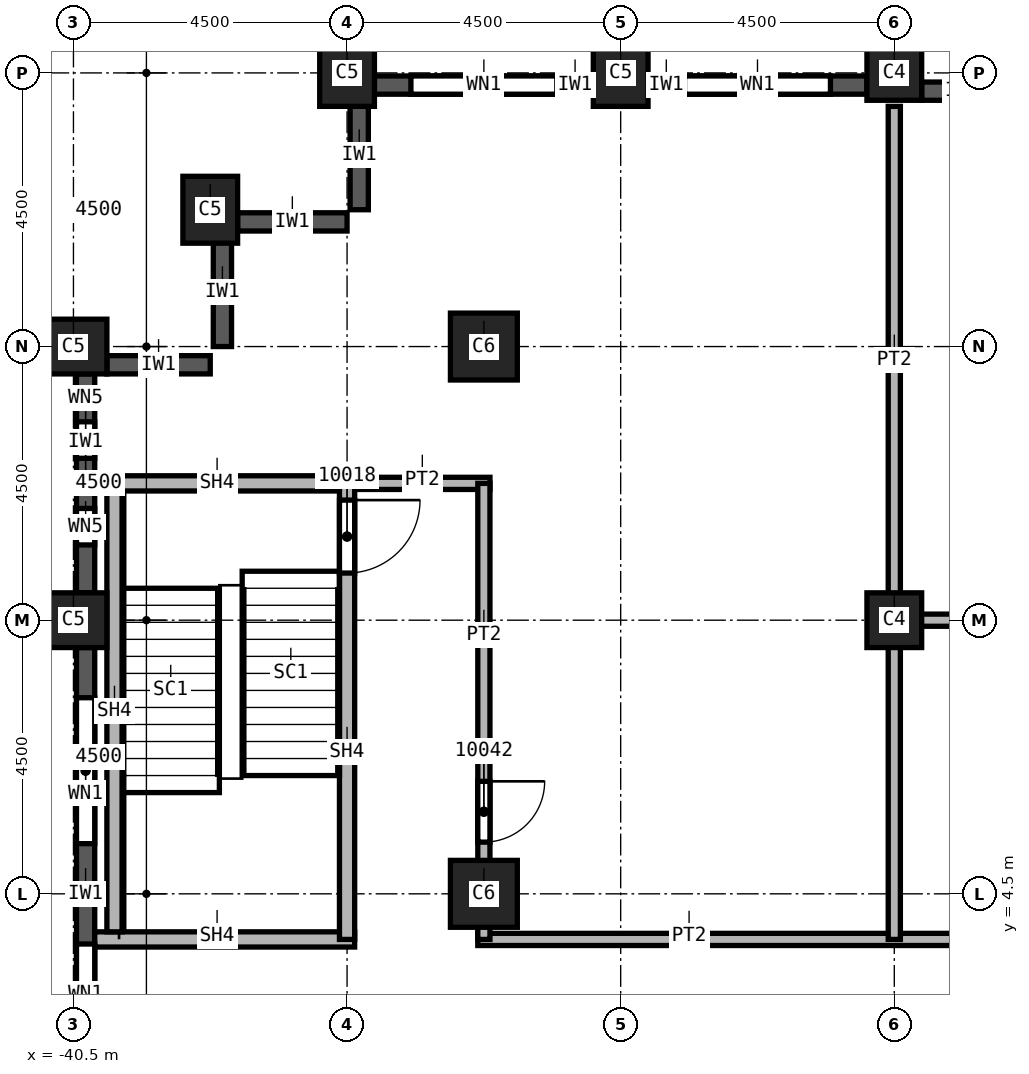
"""IFC4 building model, lengths in metres.
Left out: names, types, materials, properties, quantities, classifications, styles, units other than length and angle.
Written with IfcOpenShell. Run it as: python <this file> out.ifc"""

import sys

from ifc_helpers import new_model, si_unit, direction, frame, frame_2d, origin, origin_2d, place, context, subcontext, project, spatial, rectangle, extrude, element, fill, save


model = new_model("IFC4")
c1 = context("Model", 3, precision=1e-05, world=origin(), true_north=direction((0.0, 1.0)))
c2 = subcontext(c1, "Body", "Model", "MODEL_VIEW")
j1 = project(units=[si_unit("LENGTHUNIT", "METRE"), si_unit("PLANEANGLEUNIT", "RADIAN")], contexts=[c1])
p1 = place(None, origin())
s1 = spatial("IfcSite", under=j1, at=p1, CompositionType="ELEMENT")
p2 = place(p1, origin())
s2 = spatial("IfcBuilding", under=s1, at=p2, CompositionType="ELEMENT")
p3 = place(p2, frame((0.0, 0.0, 170.0)))
s3 = spatial("IfcBuildingStorey", under=s2, at=p3, CompositionType="ELEMENT", Elevation=170.0)
for number, where, z_axis, x_axis in (
    (1, (-40.5, 9.0, 0.0), (0.0, 0.0, 1.0), (0.0, 1.0, 0.0)),
    (2, (-40.5, 13.5, 0.0), (0.0, 0.0, 1.0), (0.0, 1.0, 0.0)),
    (3, (-38.25, 15.75, 0.0), (0.0, 0.0, 1.0), (1.0, 0.0, 0.0)),
    (4, (-31.5, 18.0, 0.0), (0.0, 0.0, 1.0), (1.0, 0.0, 0.0)),
    (5, (-36.0, 18.0, 0.0), (0.0, 0.0, 1.0), (1.0, 0.0, 0.0)),
):
    element("IfcColumn", number, at=place(p3, frame(where, z_axis=z_axis, x_axis=x_axis)), inside=s3, PredefinedType="COLUMN", context=c2, shape_type="SweptSolid", body=[
        extrude(rectangle(XDim=0.9, YDim=1.1, at=origin_2d()), origin(), (0.0, 0.0, 1.0), 3.7),
    ])
for number, where, z_axis, x_axis in (
    (6, (-33.75, 4.5, 0.0), (0.0, 0.0, 1.0), (1.0, 0.0, 0.0)),
    (7, (-33.75, 13.5, 0.0), (0.0, 0.0, 1.0), (1.0, 0.0, 0.0)),
):
    element("IfcColumn", number, at=place(p3, frame(where, z_axis=z_axis, x_axis=x_axis)), inside=s3, PredefinedType="COLUMN", context=c2, shape_type="SweptSolid", body=[
        extrude(rectangle(XDim=1.1, YDim=1.1, at=origin_2d()), origin(), (0.0, 0.0, 1.0), 3.7),
    ])
for number, where, z_axis, x_axis in (
    (8, (-27.0, 9.0, 0.0), (0.0, 0.0, 1.0), (1.0, 0.0, 0.0)),
    (9, (-27.0, 18.0, 0.0), (0.0, 0.0, 1.0), (1.0, 0.0, 0.0)),
):
    element("IfcColumn", number, at=place(p3, frame(where, z_axis=z_axis, x_axis=x_axis)), inside=s3, PredefinedType="COLUMN", context=c2, shape_type="SweptSolid", body=[
        extrude(rectangle(XDim=0.9, YDim=0.9, at=origin_2d()), origin(), (0.0, 0.0, 1.0), 3.7),
    ])
for number, where, z_axis, x_axis in (
    (10, (-35.8, 17.55, 0.0), (0.0, 0.0, 1.0), (0.0, -1.0, 0.0)),
    (11, (-37.8, 15.55, 0.0), (0.0, 0.0, 1.0), (1.0, 0.0, 0.0)),
    (12, (-38.05, 15.3, 0.0), (0.0, 0.0, 1.0), (0.0, -1.0, 0.0)),
):
    element("IfcWall", number, at=place(p3, frame(where, z_axis=z_axis, x_axis=x_axis)), inside=s3, PredefinedType="SOLIDWALL", context=c2, shape_type="SweptSolid", body=[
        extrude(rectangle(XDim=1.8, YDim=0.3, at=frame_2d((0.9, 0.0))), origin(), (0.0, 0.0, 1.0), 3.1),
    ])
p4 = place(p3, frame((-39.95, 13.2, 0.0), z_axis=(0.0, 0.0, 1.0), x_axis=(1.0, 0.0, 0.0)))
e13 = element("IfcWall", 13, at=p4, inside=s3, PredefinedType="SOLIDWALL", context=c2, shape_type="SweptSolid", body=[
    extrude(rectangle(XDim=1.7, YDim=0.3, at=frame_2d((0.85, 0.0))), origin(), (0.0, 0.0, 1.0), 3.1),
])
p5 = place(p3, frame((-25.2, 17.7, 0.0), z_axis=(0.0, 0.0, 1.0), x_axis=(-1.0, 0.0, 0.0)))
e14 = element("IfcWall", 14, at=p5, inside=s3, PredefinedType="SOLIDWALL", context=c2, shape_type="SweptSolid", body=[
    extrude(rectangle(XDim=1.35, YDim=0.3, at=frame_2d((0.675, 0.0))), origin(), (0.0, 0.0, 1.0), 3.1),
])
p6 = place(p3, frame((-27.45, 17.8, 0.0), z_axis=(0.0, 0.0, 1.0), x_axis=(-1.0, 0.0, 0.0)))
e15 = element("IfcWall", 15, at=p6, inside=s3, PredefinedType="SOLIDWALL", context=c2, shape_type="SweptSolid", body=[
    extrude(rectangle(XDim=3.6, YDim=0.3, at=frame_2d((1.8, 0.0))), origin(), (0.0, 0.0, 1.0), 3.1),
])
p7 = place(p6, frame((0.6, 0.0, 0.8)))
e16 = element("IfcOpeningElement", 16, at=p7, cuts=e15, PredefinedType="OPENING", context=c2, shape_type="SweptSolid", body=[
    extrude(rectangle(XDim=2.4, YDim=1.95, at=frame_2d((1.2, 0.975))), frame((0.0, 0.15, 0.0), z_axis=(0.0, -1.0, 0.0), x_axis=(1.0, 0.0, 0.0)), (0.0, 0.0, 1.0), 0.3),
])
p8 = place(p3, frame((-31.95, 17.8, 0.0), z_axis=(0.0, 0.0, 1.0), x_axis=(-1.0, 0.0, 0.0)))
e17 = element("IfcWall", 17, at=p8, inside=s3, PredefinedType="SOLIDWALL", context=c2, shape_type="SweptSolid", body=[
    extrude(rectangle(XDim=3.6, YDim=0.3, at=frame_2d((1.8, 0.0))), origin(), (0.0, 0.0, 1.0), 3.1),
])
p9 = place(p8, frame((0.6, 0.0, 0.8)))
e18 = element("IfcOpeningElement", 18, at=p9, cuts=e17, PredefinedType="OPENING", context=c2, shape_type="SweptSolid", body=[
    extrude(rectangle(XDim=2.4, YDim=1.95, at=frame_2d((1.2, 0.975))), frame((0.0, 0.15, 0.0), z_axis=(0.0, -1.0, 0.0), x_axis=(1.0, 0.0, 0.0)), (0.0, 0.0, 1.0), 0.3),
])
p10 = place(p3, frame((-40.3, 13.05, 0.0), z_axis=(0.0, 0.0, 1.0), x_axis=(0.0, -1.0, 0.0)))
e19 = element("IfcWall", 19, at=p10, inside=s3, PredefinedType="SOLIDWALL", context=c2, shape_type="SweptSolid", body=[
    extrude(rectangle(XDim=3.6, YDim=0.3, at=frame_2d((1.8, 0.0))), origin(), (0.0, 0.0, 1.0), 3.1),
])
p11 = place(p10, frame((0.788, 0.0, 0.8)))
e20 = element("IfcOpeningElement", 20, at=p11, cuts=e19, PredefinedType="OPENING", context=c2, shape_type="SweptSolid", body=[
    extrude(rectangle(XDim=0.6, YDim=1.95, at=frame_2d((0.3, 0.975))), frame((0.0, 0.15, 0.0), z_axis=(0.0, -1.0, 0.0), x_axis=(1.0, 0.0, 0.0)), (0.0, 0.0, 1.0), 0.3),
])
p12 = place(p10, frame((2.212, 0.0, 0.8)))
e21 = element("IfcOpeningElement", 21, at=p12, cuts=e19, PredefinedType="OPENING", context=c2, shape_type="SweptSolid", body=[
    extrude(rectangle(XDim=0.6, YDim=1.95, at=frame_2d((0.3, 0.975))), frame((0.0, 0.15, 0.0), z_axis=(0.0, -1.0, 0.0), x_axis=(1.0, 0.0, 0.0)), (0.0, 0.0, 1.0), 0.3),
])
p13 = place(p3, frame((-40.3, 8.55, 0.0), z_axis=(0.0, 0.0, 1.0), x_axis=(0.0, -1.0, 0.0)))
e22 = element("IfcWall", 22, at=p13, inside=s3, PredefinedType="SOLIDWALL", context=c2, shape_type="SweptSolid", body=[
    extrude(rectangle(XDim=8.1, YDim=0.3, at=frame_2d((4.05, 0.0))), origin(), (0.0, 0.0, 1.0), 3.1),
])
p14 = place(p13, frame((0.825, 0.0, 0.8)))
e23 = element("IfcOpeningElement", 23, at=p14, cuts=e22, PredefinedType="OPENING", context=c2, shape_type="SweptSolid", body=[
    extrude(rectangle(XDim=2.4, YDim=1.95, at=frame_2d((1.2, 0.975))), frame((0.0, 0.15, 0.0), z_axis=(0.0, -1.0, 0.0), x_axis=(1.0, 0.0, 0.0)), (0.0, 0.0, 1.0), 0.3),
])
p15 = place(p13, frame((4.875, 0.0, 0.8)))
e24 = element("IfcOpeningElement", 24, at=p15, cuts=e22, PredefinedType="OPENING", context=c2, shape_type="SweptSolid", body=[
    extrude(rectangle(XDim=2.4, YDim=1.95, at=frame_2d((1.2, 0.975))), frame((0.0, 0.15, 0.0), z_axis=(0.0, -1.0, 0.0), x_axis=(1.0, 0.0, 0.0)), (0.0, 0.0, 1.0), 0.3),
])
p16 = place(p3, frame((-36.0, 11.25, 0.0), z_axis=(0.0, 0.0, 1.0), x_axis=(1.0, 0.0, 0.0)))
e25 = element("IfcWall", 25, at=p16, inside=s3, PredefinedType="PARTITIONING", context=c2, shape_type="SweptSolid", body=[
    extrude(rectangle(XDim=2.35, YDim=0.2, at=frame_2d((1.175, 0.0))), origin(), (0.0, 0.0, 1.0), 3.7),
])
p17 = place(p3, frame((-33.85, 3.75, 0.0), z_axis=(0.0, 0.0, 1.0), x_axis=(1.0, 0.0, 0.0)))
e26 = element("IfcWall", 26, at=p17, inside=s3, PredefinedType="PARTITIONING", context=c2, shape_type="SweptSolid", body=[
    extrude(rectangle(XDim=18.45, YDim=0.2, at=frame_2d((9.225, 0.0))), origin(), (0.0, 0.0, 1.0), 3.7),
])
p18 = place(p3, frame((-33.75, 11.25, 0.0), z_axis=(0.0, 0.0, 1.0), x_axis=(0.0, -1.0, 0.0)))
e27 = element("IfcWall", 27, at=p18, inside=s3, PredefinedType="PARTITIONING", context=c2, shape_type="SweptSolid", body=[
    extrude(rectangle(XDim=7.5, YDim=0.2, at=frame_2d((3.75, 0.0))), origin(), (0.0, 0.0, 1.0), 3.7),
])
p19 = place(p18, frame((4.9, 0.0, 0.0)))
e28 = element("IfcOpeningElement", 28, at=p19, cuts=e27, PredefinedType="OPENING", context=c2, shape_type="SweptSolid", body=[
    extrude(rectangle(XDim=1.0, YDim=2.1, at=frame_2d((0.5, 1.05))), frame((0.0, 0.1, 0.0), z_axis=(0.0, -1.0, 0.0), x_axis=(1.0, 0.0, 0.0)), (0.0, 0.0, 1.0), 0.2),
])
p20 = place(p3, frame((-27.1, 9.0, 0.0), z_axis=(0.0, 0.0, 1.0), x_axis=(1.0, 0.0, 0.0)))
e29 = element("IfcWall", 29, at=p20, inside=s3, PredefinedType="PARTITIONING", context=c2, shape_type="SweptSolid", body=[
    extrude(rectangle(XDim=11.7, YDim=0.2, at=frame_2d((5.85, 0.0))), origin(), (0.0, 0.0, 1.0), 3.7),
])
p21 = place(p3, frame((-27.0, 3.75, 0.0), z_axis=(0.0, 0.0, 1.0), x_axis=(0.0, 1.0, 0.0)))
e30 = element("IfcWall", 30, at=p21, inside=s3, PredefinedType="PARTITIONING", context=c2, shape_type="SweptSolid", body=[
    extrude(rectangle(XDim=13.7, YDim=0.2, at=frame_2d((6.85, 0.0))), origin(), (0.0, 0.0, 1.0), 3.7),
])
p22 = place(p3, frame((-40.15, 3.75, 0.0), z_axis=(0.0, 0.0, 1.0), x_axis=(1.0, 0.0, 0.0)))
e31 = element("IfcWall", 31, at=p22, inside=s3, PredefinedType="SOLIDWALL", context=c2, shape_type="SweptSolid", body=[
    extrude(rectangle(XDim=4.275, YDim=0.25, at=frame_2d((2.137, 0.0))), origin(), (0.0, 0.0, 1.0), 3.7),
])
p23 = place(p3, frame((-40.15, 11.25, 0.0), z_axis=(0.0, 0.0, 1.0), x_axis=(1.0, 0.0, 0.0)))
e32 = element("IfcWall", 32, at=p23, inside=s3, PredefinedType="SOLIDWALL", context=c2, shape_type="SweptSolid", body=[
    extrude(rectangle(XDim=4.15, YDim=0.25, at=frame_2d((2.075, 0.0))), origin(), (0.0, 0.0, 1.0), 3.7),
])
p24 = place(p3, frame((-36.0, 11.375, 0.0), z_axis=(0.0, 0.0, 1.0), x_axis=(0.0, -1.0, 0.0)))
e33 = element("IfcWall", 33, at=p24, inside=s3, PredefinedType="SOLIDWALL", context=c2, shape_type="SweptSolid", body=[
    extrude(rectangle(XDim=7.625, YDim=0.25, at=frame_2d((3.812, 0.0))), origin(), (0.0, 0.0, 1.0), 3.7),
])
p25 = place(p24, frame((0.4, 0.0, 0.0)))
e34 = element("IfcOpeningElement", 34, at=p25, cuts=e33, PredefinedType="OPENING", context=c2, shape_type="SweptSolid", body=[
    extrude(rectangle(XDim=1.2, YDim=2.1, at=frame_2d((0.6, 1.05))), frame((0.0, 0.125, 0.0), z_axis=(0.0, -1.0, 0.0), x_axis=(1.0, 0.0, 0.0)), (0.0, 0.0, 1.0), 0.25),
])
p26 = place(p3, frame((-39.825, 3.875, 0.0), z_axis=(0.0, 0.0, 1.0), x_axis=(0.0, 1.0, 0.0)))
e35 = element("IfcWall", 35, at=p26, inside=s3, PredefinedType="SOLIDWALL", context=c2, shape_type="SweptSolid", body=[
    extrude(rectangle(XDim=7.25, YDim=0.25, at=frame_2d((3.625, 0.0))), origin(), (0.0, 0.0, 1.0), 3.7),
])
p27 = place(p7, origin())
e36 = element("IfcWindow", 36, at=p27, inside=s3, PartitioningType="SINGLE_PANEL", PredefinedType="WINDOW", context=c2, shape_type="SweptSolid", body=[
    extrude(rectangle(XDim=2.4, YDim=1.95, at=frame_2d((1.2, 0.975))), frame((0.0, 0.03, 0.0), z_axis=(0.0, -1.0, 0.0), x_axis=(1.0, 0.0, 0.0)), (0.0, 0.0, 1.0), 0.06),
])
fill(e16, e36)
p28 = place(p9, origin())
e37 = element("IfcWindow", 37, at=p28, inside=s3, PartitioningType="SINGLE_PANEL", PredefinedType="WINDOW", context=c2, shape_type="SweptSolid", body=[
    extrude(rectangle(XDim=2.4, YDim=1.95, at=frame_2d((1.2, 0.975))), frame((0.0, 0.03, 0.0), z_axis=(0.0, -1.0, 0.0), x_axis=(1.0, 0.0, 0.0)), (0.0, 0.0, 1.0), 0.06),
])
fill(e18, e37)
p29 = place(p14, origin())
e38 = element("IfcWindow", 38, at=p29, inside=s3, PartitioningType="SINGLE_PANEL", PredefinedType="WINDOW", context=c2, shape_type="SweptSolid", body=[
    extrude(rectangle(XDim=2.4, YDim=1.95, at=frame_2d((1.2, 0.975))), frame((0.0, 0.03, 0.0), z_axis=(0.0, -1.0, 0.0), x_axis=(1.0, 0.0, 0.0)), (0.0, 0.0, 1.0), 0.06),
])
fill(e23, e38)
p30 = place(p15, origin())
e39 = element("IfcWindow", 39, at=p30, inside=s3, PartitioningType="SINGLE_PANEL", PredefinedType="WINDOW", context=c2, shape_type="SweptSolid", body=[
    extrude(rectangle(XDim=2.4, YDim=1.95, at=frame_2d((1.2, 0.975))), frame((0.0, 0.03, 0.0), z_axis=(0.0, -1.0, 0.0), x_axis=(1.0, 0.0, 0.0)), (0.0, 0.0, 1.0), 0.06),
])
fill(e24, e39)
p31 = place(p25, origin())
e40 = element("IfcDoor", 40, at=p31, inside=s3, OperationType="SINGLE_SWING_LEFT", PredefinedType="DOOR", context=c2, shape_type="SweptSolid", body=[
    extrude(rectangle(XDim=1.2, YDim=2.1, at=frame_2d((0.6, 1.05))), frame((0.0, 0.025, 0.0), z_axis=(0.0, -1.0, 0.0), x_axis=(1.0, 0.0, 0.0)), (0.0, 0.0, 1.0), 0.05),
])
fill(e34, e40)
p32 = place(p19, origin())
e41 = element("IfcDoor", 41, at=p32, inside=s3, OperationType="SINGLE_SWING_LEFT", PredefinedType="DOOR", context=c2, shape_type="SweptSolid", body=[
    extrude(rectangle(XDim=1.0, YDim=2.1, at=frame_2d((0.5, 1.05))), frame((0.0, 0.025, 0.0), z_axis=(0.0, -1.0, 0.0), x_axis=(1.0, 0.0, 0.0)), (0.0, 0.0, 1.0), 0.05),
])
fill(e28, e41)
p33 = place(p11, origin())
e42 = element("IfcWindow", 42, at=p33, inside=s3, PartitioningType="SINGLE_PANEL", PredefinedType="WINDOW", context=c2, shape_type="SweptSolid", body=[
    extrude(rectangle(XDim=0.6, YDim=1.95, at=frame_2d((0.3, 0.975))), frame((0.0, 0.03, 0.0), z_axis=(0.0, -1.0, 0.0), x_axis=(1.0, 0.0, 0.0)), (0.0, 0.0, 1.0), 0.06),
])
fill(e20, e42)
p34 = place(p12, origin())
e43 = element("IfcWindow", 43, at=p34, inside=s3, PartitioningType="SINGLE_PANEL", PredefinedType="WINDOW", context=c2, shape_type="SweptSolid", body=[
    extrude(rectangle(XDim=0.6, YDim=1.95, at=frame_2d((0.3, 0.975))), frame((0.0, 0.03, 0.0), z_axis=(0.0, -1.0, 0.0), x_axis=(1.0, 0.0, 0.0)), (0.0, 0.0, 1.0), 0.06),
])
fill(e21, e43)
save(model, sys.argv[1])
